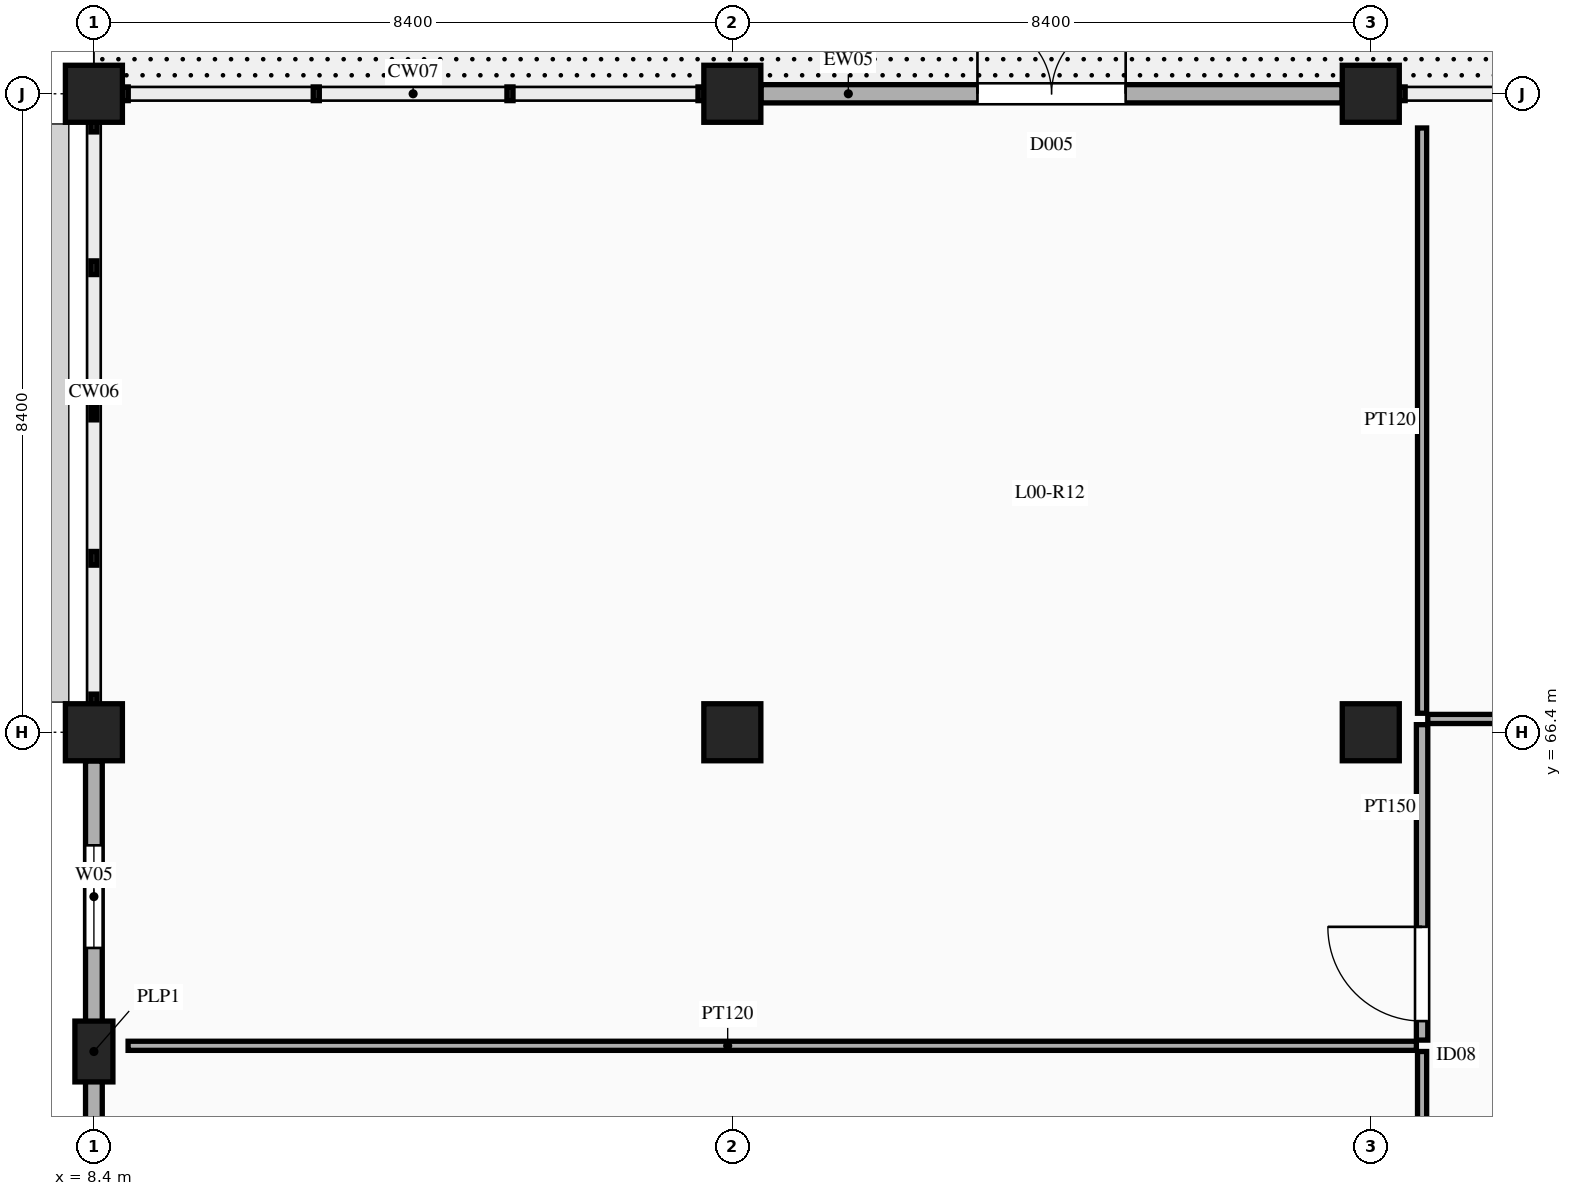
"""IFC4 building model, lengths in metres.
Left out: names, types, materials, properties, quantities, classifications, styles, units other than length and angle.
Written with IfcOpenShell. Run it as: python <this file> out.ifc"""

import sys

from ifc_helpers import new_model, si_unit, direction, frame, frame_2d, origin, origin_2d, place, context, subcontext, project, spatial, rectangle, extrude, element, fill, save


model = new_model("IFC4")
c1 = context("Model", 3, precision=1e-05, world=origin(), true_north=direction((0.0, 1.0)))
c2 = subcontext(c1, "Body", "Model", "MODEL_VIEW")
j1 = project(units=[si_unit("LENGTHUNIT", "METRE"), si_unit("PLANEANGLEUNIT", "RADIAN")], contexts=[c1])
p1 = place(None, origin())
s1 = spatial("IfcSite", under=j1, at=p1, CompositionType="ELEMENT")
p2 = place(p1, origin())
s2 = spatial("IfcBuilding", under=s1, at=p2, CompositionType="ELEMENT")
p3 = place(p2, origin())
s3 = spatial("IfcBuildingStorey", under=s2, at=p3, CompositionType="ELEMENT", Elevation=0.0)
for number, where, z_axis, x_axis in (
    (1, (8.4, 66.4, 0.0), (0.0, 0.0, 1.0), (1.0, 0.0, 0.0)),
    (2, (8.4, 74.8, 0.0), (0.0, 0.0, 1.0), (1.0, 0.0, 0.0)),
    (3, (16.8, 66.4, 0.0), (0.0, 0.0, 1.0), (1.0, 0.0, 0.0)),
    (4, (16.8, 74.8, 0.0), (0.0, 0.0, 1.0), (1.0, 0.0, 0.0)),
    (5, (25.2, 66.4, 0.0), (0.0, 0.0, 1.0), (1.0, 0.0, 0.0)),
    (6, (25.2, 74.8, 0.0), (0.0, 0.0, 1.0), (1.0, 0.0, 0.0)),
):
    element("IfcColumn", number, at=place(p3, frame(where, z_axis=z_axis, x_axis=x_axis)), inside=s3, PredefinedType="COLUMN", context=c2, shape_type="SweptSolid", body=[
        extrude(rectangle(XDim=0.75, YDim=0.75, at=origin_2d()), origin(), (0.0, 0.0, 1.0), 5.4),
    ])
p4 = place(p3, frame((8.4, 62.2, 0.0), z_axis=(0.0, 0.0, 1.0), x_axis=(1.0, 0.0, 0.0)))
e7 = element("IfcColumn", 7, at=p4, inside=s3, PredefinedType="PILASTER", context=c2, shape_type="SweptSolid", body=[
    extrude(rectangle(XDim=0.8, YDim=0.5, at=origin_2d()), origin(), (0.0, 0.0, 1.0), 5.4),
])
p5 = place(p3, frame((17.177, 74.8, 0.0), z_axis=(0.0, 0.0, 1.0), x_axis=(1.0, 0.0, 0.0)))
e8 = element("IfcWall", 8, at=p5, inside=s3, PredefinedType="SOLIDWALL", context=c2, shape_type="SweptSolid", body=[
    extrude(rectangle(XDim=7.646, YDim=0.24, at=frame_2d((3.823, 0.0))), origin(), (0.0, 0.0, 1.0), 4.45),
])
p6 = place(p5, frame((2.848, 0.0, 0.0)))
e9 = element("IfcOpeningElement", 9, at=p6, cuts=e8, PredefinedType="OPENING", context=c2, shape_type="SweptSolid", body=[
    extrude(rectangle(XDim=1.95, YDim=2.4, at=frame_2d((0.975, 1.2))), frame((0.0, 0.13, 0.0), z_axis=(0.0, -1.0, 0.0), x_axis=(1.0, 0.0, 0.0)), (0.0, 0.0, 1.0), 0.26),
])
p7 = place(p3, frame((8.4, 58.377, 0.0), z_axis=(0.0, 0.0, 1.0), x_axis=(0.0, 1.0, 0.0)))
e10 = element("IfcWall", 10, at=p7, inside=s3, PredefinedType="USERDEFINED", context=c2, shape_type="SweptSolid", body=[
    extrude(rectangle(XDim=3.571, YDim=0.22, at=frame_2d((1.786, 0.0))), origin(), (0.0, 0.0, 1.0), 4.45),
])
p8 = place(p7, frame((1.236, 0.0, 0.9)))
e11 = element("IfcOpeningElement", 11, at=p8, cuts=e10, PredefinedType="OPENING", context=c2, shape_type="SweptSolid", body=[
    extrude(rectangle(XDim=1.1, YDim=1.95, at=frame_2d((0.55, 0.975))), frame((0.0, 0.12, 0.0), z_axis=(0.0, -1.0, 0.0), x_axis=(1.0, 0.0, 0.0)), (0.0, 0.0, 1.0), 0.24),
])
p9 = place(p3, frame((8.4, 62.452, 0.0), z_axis=(0.0, 0.0, 1.0), x_axis=(0.0, 1.0, 0.0)))
e12 = element("IfcWall", 12, at=p9, inside=s3, PredefinedType="USERDEFINED", context=c2, shape_type="SweptSolid", body=[
    extrude(rectangle(XDim=3.571, YDim=0.22, at=frame_2d((1.786, 0.0))), origin(), (0.0, 0.0, 1.0), 4.45),
])
p10 = place(p9, frame((1.111, 0.0, 0.9)))
e13 = element("IfcOpeningElement", 13, at=p10, cuts=e12, PredefinedType="OPENING", context=c2, shape_type="SweptSolid", body=[
    extrude(rectangle(XDim=1.35, YDim=1.85, at=frame_2d((0.675, 0.925))), frame((0.0, 0.12, 0.0), z_axis=(0.0, -1.0, 0.0), x_axis=(1.0, 0.0, 0.0)), (0.0, 0.0, 1.0), 0.24),
])
p11 = place(p3, frame((25.875, 42.55, 0.0), z_axis=(0.0, 0.0, 1.0), x_axis=(0.0, 1.0, 0.0)))
e14 = element("IfcWall", 14, at=p11, inside=s3, PredefinedType="PARTITIONING", context=c2, shape_type="SweptSolid", body=[
    extrude(rectangle(XDim=19.65, YDim=0.12, at=frame_2d((9.825, 0.0))), origin(), (0.0, 0.0, 1.0), 4.35),
])
p12 = place(p11, frame((10.45, 0.0, 0.0)))
e15 = element("IfcOpeningElement", 15, at=p12, cuts=e14, PredefinedType="OPENING", context=c2, shape_type="SweptSolid", body=[
    extrude(rectangle(XDim=1.6, YDim=2.35, at=frame_2d((0.8, 1.175))), frame((0.0, 0.07, 0.0), z_axis=(0.0, -1.0, 0.0), x_axis=(1.0, 0.0, 0.0)), (0.0, 0.0, 1.0), 0.14),
])
p13 = place(p3, frame((25.875, 62.35, 0.0), z_axis=(0.0, 0.0, 1.0), x_axis=(0.0, 1.0, 0.0)))
e16 = element("IfcWall", 16, at=p13, inside=s3, PredefinedType="PARTITIONING", context=c2, shape_type="SweptSolid", body=[
    extrude(rectangle(XDim=4.15, YDim=0.15, at=frame_2d((2.075, 0.0))), origin(), (0.0, 0.0, 1.0), 4.35),
])
p14 = place(p13, frame((0.25, 0.0, 0.0)))
e17 = element("IfcOpeningElement", 17, at=p14, cuts=e16, PredefinedType="OPENING", context=c2, shape_type="SweptSolid", body=[
    extrude(rectangle(XDim=1.24, YDim=2.2, at=frame_2d((0.62, 1.1))), frame((0.0, 0.085, 0.0), z_axis=(0.0, -1.0, 0.0), x_axis=(1.0, 0.0, 0.0)), (0.0, 0.0, 1.0), 0.17),
])
p15 = place(p3, frame((25.95, 66.575, 0.0), z_axis=(0.0, 0.0, 1.0), x_axis=(1.0, 0.0, 0.0)))
e18 = element("IfcWall", 18, at=p15, inside=s3, PredefinedType="PARTITIONING", context=c2, shape_type="SweptSolid", body=[
    extrude(rectangle(XDim=2.8, YDim=0.12, at=frame_2d((1.4, 0.0))), origin(), (0.0, 0.0, 1.0), 4.35),
])
p16 = place(p3, frame((8.85, 62.275, 0.0), z_axis=(0.0, 0.0, 1.0), x_axis=(1.0, 0.0, 0.0)))
e19 = element("IfcWall", 19, at=p16, inside=s3, PredefinedType="PARTITIONING", context=c2, shape_type="SweptSolid", body=[
    extrude(rectangle(XDim=16.95, YDim=0.12, at=frame_2d((8.475, 0.0))), origin(), (0.0, 0.0, 1.0), 4.35),
])
p17 = place(p3, frame((25.875, 66.65, 0.0), z_axis=(0.0, 0.0, 1.0), x_axis=(0.0, 1.0, 0.0)))
e20 = element("IfcWall", 20, at=p17, inside=s3, PredefinedType="PARTITIONING", context=c2, shape_type="SweptSolid", body=[
    extrude(rectangle(XDim=7.7, YDim=0.12, at=frame_2d((3.85, 0.0))), origin(), (0.0, 0.0, 1.0), 4.35),
])
p18 = place(p6, origin())
e21 = element("IfcDoor", 21, at=p18, inside=s3, OperationType="DOUBLE_DOOR_SINGLE_SWING", PredefinedType="DOOR", context=c2, shape_type="SweptSolid", body=[
    extrude(rectangle(XDim=1.95, YDim=2.4, at=frame_2d((0.975, 1.2))), frame((0.0, 0.025, 0.0), z_axis=(0.0, -1.0, 0.0), x_axis=(1.0, 0.0, 0.0)), (0.0, 0.0, 1.0), 0.05),
])
fill(e9, e21)
p19 = place(p10, origin())
e22 = element("IfcWindow", 22, at=p19, inside=s3, PartitioningType="DOUBLE_PANEL_VERTICAL", PredefinedType="WINDOW", context=c2, shape_type="SweptSolid", body=[
    extrude(rectangle(XDim=1.35, YDim=1.85, at=frame_2d((0.675, 0.925))), frame((0.0, 0.03, 0.0), z_axis=(0.0, -1.0, 0.0), x_axis=(1.0, 0.0, 0.0)), (0.0, 0.0, 1.0), 0.06),
])
fill(e13, e22)
p20 = place(p14, origin())
e23 = element("IfcDoor", 23, at=p20, inside=s3, OperationType="SINGLE_SWING_RIGHT", PredefinedType="DOOR", context=c2, shape_type="SweptSolid", body=[
    extrude(rectangle(XDim=1.24, YDim=2.2, at=frame_2d((0.62, 1.1))), frame((0.0, 0.025, 0.0), z_axis=(0.0, -1.0, 0.0), x_axis=(1.0, 0.0, 0.0)), (0.0, 0.0, 1.0), 0.05),
])
fill(e17, e23)
save(model, sys.argv[1])
